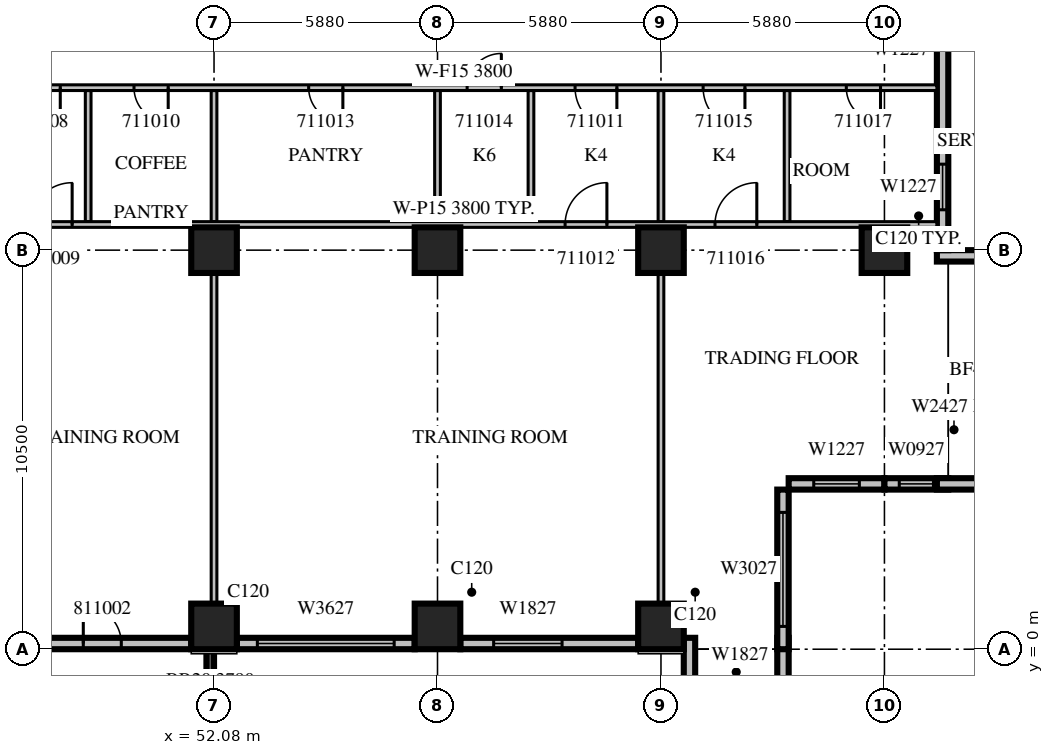
"""IFC4 building model, lengths in metres.
Left out: names, types, materials, properties, quantities, classifications, styles, units other than length and angle.
Written with IfcOpenShell. Run it as: python <this file> out.ifc"""

import sys

from ifc_helpers import new_model, si_unit, direction, frame, frame_2d, origin, origin_2d, place, context, subcontext, project, spatial, rectangle, extrude, source, transform, mapped, element, fill, save


model = new_model("IFC4")
c1 = context("Model", 3, precision=1e-05, world=origin(), true_north=direction((0.0, 1.0)))
c2 = subcontext(c1, "Body", "Model", "MODEL_VIEW")
j1 = project(units=[si_unit("LENGTHUNIT", "METRE"), si_unit("PLANEANGLEUNIT", "RADIAN")], contexts=[c1])
p1 = place(None, origin())
s1 = spatial("IfcSite", under=j1, at=p1, CompositionType="ELEMENT")
p2 = place(p1, origin())
s2 = spatial("IfcBuilding", under=s1, at=p2, CompositionType="ELEMENT")
p3 = place(p2, frame((0.0, 0.0, 57.3)))
s3 = spatial("IfcBuildingStorey", under=s2, at=p3, CompositionType="ELEMENT", Elevation=57.3)
m1 = source(origin(), c2, "Body", "SweptSolid", [
    extrude(rectangle(XDim=1.2, YDim=1.2, at=origin_2d()), origin(), (0.0, 0.0, 1.0), 4.2),
])
for number, where, z_axis, x_axis in (
    (1, (52.08, 0.6, 0.0), (0.0, 0.0, 1.0), (1.0, 0.0, 0.0)),
    (2, (57.96, 0.6, 0.0), (0.0, 0.0, 1.0), (1.0, 0.0, 0.0)),
    (3, (63.84, 0.6, 0.0), (0.0, 0.0, 1.0), (1.0, 0.0, 0.0)),
    (4, (52.08, 10.5, 0.0), (0.0, 0.0, 1.0), (1.0, 0.0, 0.0)),
    (5, (57.96, 10.5, 0.0), (0.0, 0.0, 1.0), (1.0, 0.0, 0.0)),
    (6, (63.84, 10.5, 0.0), (0.0, 0.0, 1.0), (1.0, 0.0, 0.0)),
    (7, (69.72, 10.5, 0.0), (0.0, 0.0, 1.0), (1.0, 0.0, 0.0)),
):
    element("IfcColumn", number, at=place(p3, frame(where, z_axis=z_axis, x_axis=x_axis)), inside=s3, PredefinedType="COLUMN", context=c2, shape_type="MappedRepresentation", body=[
        mapped(m1, transform((0.0, 0.0, 0.0), scale=1.0)),
    ])
m2 = source(origin(), c2, "Body", "SweptSolid", [
    extrude(rectangle(XDim=4.68, YDim=0.3, at=frame_2d((2.34, 0.0))), origin(), (0.0, 0.0, 1.0), 3.8),
])
p4 = place(p3, frame((46.8, 0.15, 0.0), z_axis=(0.0, 0.0, 1.0), x_axis=(1.0, 0.0, 0.0)))
e8 = element("IfcWall", 8, at=p4, inside=s3, PredefinedType="STANDARD", context=c2, shape_type="MappedRepresentation", body=[
    mapped(m2, transform((0.0, 0.0, 0.0), scale=1.0)),
])
m3 = source(origin(), c2, "Body", "SweptSolid", [
    extrude(rectangle(XDim=1.0, YDim=2.1, at=frame_2d((0.5, 1.05))), frame((0.0, 0.16, 0.0), z_axis=(0.0, -1.0, 0.0), x_axis=(1.0, 0.0, 0.0)), (0.0, 0.0, 1.0), 0.32),
])
p5 = place(p4, frame((1.84, 0.0, 0.0)))
e9 = element("IfcOpeningElement", 9, at=p5, cuts=e8, PredefinedType="OPENING", context=c2, shape_type="MappedRepresentation", body=[
    mapped(m3, transform((0.0, 0.0, 0.0), scale=1.0)),
])
p6 = place(p3, frame((52.68, 0.15, 0.0), z_axis=(0.0, 0.0, 1.0), x_axis=(1.0, 0.0, 0.0)))
e10 = element("IfcWall", 10, at=p6, inside=s3, PredefinedType="STANDARD", context=c2, shape_type="MappedRepresentation", body=[
    mapped(m2, transform((0.0, 0.0, 0.0), scale=1.0)),
])
m4 = source(origin(), c2, "Body", "SweptSolid", [
    extrude(rectangle(XDim=3.6, YDim=2.7, at=frame_2d((1.8, 1.35))), frame((0.0, 0.16, 0.0), z_axis=(0.0, -1.0, 0.0), x_axis=(1.0, 0.0, 0.0)), (0.0, 0.0, 1.0), 0.32),
])
p7 = place(p6, frame((0.54, 0.0, 0.6)))
e11 = element("IfcOpeningElement", 11, at=p7, cuts=e10, PredefinedType="OPENING", context=c2, shape_type="MappedRepresentation", body=[
    mapped(m4, transform((0.0, 0.0, 0.0), scale=1.0)),
])
p8 = place(p3, frame((58.56, 0.15, 0.0), z_axis=(0.0, 0.0, 1.0), x_axis=(1.0, 0.0, 0.0)))
e12 = element("IfcWall", 12, at=p8, inside=s3, PredefinedType="STANDARD", context=c2, shape_type="MappedRepresentation", body=[
    mapped(m2, transform((0.0, 0.0, 0.0), scale=1.0)),
])
m5 = source(origin(), c2, "Body", "SweptSolid", [
    extrude(rectangle(XDim=1.8, YDim=2.7, at=frame_2d((0.9, 1.35))), frame((0.0, 0.16, 0.0), z_axis=(0.0, -1.0, 0.0), x_axis=(1.0, 0.0, 0.0)), (0.0, 0.0, 1.0), 0.32),
])
p9 = place(p8, frame((0.877, 0.0, 0.6)))
e13 = element("IfcOpeningElement", 13, at=p9, cuts=e12, PredefinedType="OPENING", context=c2, shape_type="MappedRepresentation", body=[
    mapped(m5, transform((0.0, 0.0, 0.0), scale=1.0)),
])
m6 = source(origin(), c2, "Body", "SweptSolid", [
    extrude(rectangle(XDim=1.2, YDim=0.3, at=frame_2d((0.6, 0.0))), origin(), (0.0, 0.0, 1.0), 3.8),
])
for number, where, z_axis, x_axis in (
    (14, (64.59, 0.3, 0.0), (0.0, 0.0, 1.0), (0.0, -1.0, 0.0)),
    (15, (67.05, 0.3, 0.0), (0.0, 0.0, 1.0), (0.0, -1.0, 0.0)),
):
    element("IfcWall", number, at=place(p3, frame(where, z_axis=z_axis, x_axis=x_axis)), inside=s3, PredefinedType="STANDARD", context=c2, shape_type="MappedRepresentation", body=[
        mapped(m6, transform((0.0, 0.0, 0.0), scale=1.0)),
    ])
m7 = source(origin(), c2, "Body", "SweptSolid", [
    extrude(rectangle(XDim=4.2, YDim=0.3, at=frame_2d((2.1, 0.0))), origin(), (0.0, 0.0, 1.0), 3.8),
])
p10 = place(p3, frame((67.05, 0.0, 0.0), z_axis=(0.0, 0.0, 1.0), x_axis=(0.0, 1.0, 0.0)))
e16 = element("IfcWall", 16, at=p10, inside=s3, PredefinedType="STANDARD", context=c2, shape_type="MappedRepresentation", body=[
    mapped(m7, transform((0.0, 0.0, 0.0), scale=1.0)),
])
m8 = source(origin(), c2, "Body", "SweptSolid", [
    extrude(rectangle(XDim=3.0, YDim=2.7, at=frame_2d((1.5, 1.35))), frame((0.0, 0.16, 0.0), z_axis=(0.0, -1.0, 0.0), x_axis=(1.0, 0.0, 0.0)), (0.0, 0.0, 1.0), 0.32),
])
p11 = place(p10, frame((0.6, 0.0, 0.6)))
e17 = element("IfcOpeningElement", 17, at=p11, cuts=e16, PredefinedType="OPENING", context=c2, shape_type="MappedRepresentation", body=[
    mapped(m8, transform((0.0, 0.0, 0.0), scale=1.0)),
])
m9 = source(origin(), c2, "Body", "SweptSolid", [
    extrude(rectangle(XDim=2.52, YDim=0.3, at=frame_2d((1.26, 0.0))), origin(), (0.0, 0.0, 1.0), 3.8),
])
p12 = place(p3, frame((67.2, 4.35, 0.0), z_axis=(0.0, 0.0, 1.0), x_axis=(1.0, 0.0, 0.0)))
e18 = element("IfcWall", 18, at=p12, inside=s3, PredefinedType="STANDARD", context=c2, shape_type="MappedRepresentation", body=[
    mapped(m9, transform((0.0, 0.0, 0.0), scale=1.0)),
])
m10 = source(origin(), c2, "Body", "SweptSolid", [
    extrude(rectangle(XDim=1.2, YDim=2.7, at=frame_2d((0.6, 1.35))), frame((0.0, 0.16, 0.0), z_axis=(0.0, -1.0, 0.0), x_axis=(1.0, 0.0, 0.0)), (0.0, 0.0, 1.0), 0.32),
])
p13 = place(p12, frame((0.66, 0.0, 0.6)))
e19 = element("IfcOpeningElement", 19, at=p13, cuts=e18, PredefinedType="OPENING", context=c2, shape_type="MappedRepresentation", body=[
    mapped(m10, transform((0.0, 0.0, 0.0), scale=1.0)),
])
m11 = source(origin(), c2, "Body", "SweptSolid", [
    extrude(rectangle(XDim=1.68, YDim=0.3, at=frame_2d((0.84, 0.0))), origin(), (0.0, 0.0, 1.0), 3.8),
])
p14 = place(p3, frame((69.72, 4.35, 0.0), z_axis=(0.0, 0.0, 1.0), x_axis=(1.0, 0.0, 0.0)))
e20 = element("IfcWall", 20, at=p14, inside=s3, PredefinedType="STANDARD", context=c2, shape_type="MappedRepresentation", body=[
    mapped(m11, transform((0.0, 0.0, 0.0), scale=1.0)),
])
m12 = source(origin(), c2, "Body", "SweptSolid", [
    extrude(rectangle(XDim=0.9, YDim=2.7, at=frame_2d((0.45, 1.35))), frame((0.0, 0.16, 0.0), z_axis=(0.0, -1.0, 0.0), x_axis=(1.0, 0.0, 0.0)), (0.0, 0.0, 1.0), 0.32),
])
p15 = place(p14, frame((0.39, 0.0, 0.6)))
e21 = element("IfcOpeningElement", 21, at=p15, cuts=e20, PredefinedType="OPENING", context=c2, shape_type="MappedRepresentation", body=[
    mapped(m12, transform((0.0, 0.0, 0.0), scale=1.0)),
])
for number, where, z_axis, x_axis in (
    (22, (71.1, 4.35, 0.0), (0.0, 0.0, 1.0), (1.0, 0.0, 0.0)),
    (23, (71.1, 10.35, 0.0), (0.0, 0.0, 1.0), (1.0, 0.0, 0.0)),
):
    element("IfcWall", number, at=place(p3, frame(where, z_axis=z_axis, x_axis=x_axis)), inside=s3, PredefinedType="STANDARD", context=c2, shape_type="MappedRepresentation", body=[
        mapped(m6, transform((0.0, 0.0, 0.0), scale=1.0)),
    ])
m13 = source(origin(), c2, "Body", "SweptSolid", [
    extrude(rectangle(XDim=6.3, YDim=0.3, at=frame_2d((3.15, 0.0))), origin(), (0.0, 0.0, 1.0), 3.8),
])
p16 = place(p3, frame((71.25, 10.5, 0.0), z_axis=(0.0, 0.0, 1.0), x_axis=(0.0, 1.0, 0.0)))
e24 = element("IfcWall", 24, at=p16, inside=s3, PredefinedType="STANDARD", context=c2, shape_type="MappedRepresentation", body=[
    mapped(m13, transform((0.0, 0.0, 0.0), scale=1.0)),
])
p17 = place(p16, frame((1.062, 0.0, 0.6)))
e25 = element("IfcOpeningElement", 25, at=p17, cuts=e24, PredefinedType="OPENING", context=c2, shape_type="MappedRepresentation", body=[
    mapped(m10, transform((0.0, 0.0, 0.0), scale=1.0)),
])
m14 = source(origin(), c2, "Body", "SweptSolid", [
    extrude(rectangle(XDim=3.9, YDim=0.2, at=frame_2d((1.95, 0.0))), origin(), (0.0, 0.0, 1.0), 3.79),
])
p18 = place(p3, frame((51.98, 0.0, 0.0), z_axis=(0.0, 0.0, 1.0), x_axis=(0.0, -1.0, 0.0)))
e26 = element("IfcWall", 26, at=p18, inside=s3, PredefinedType="SOLIDWALL", context=c2, shape_type="MappedRepresentation", body=[
    mapped(m14, transform((0.0, 0.0, 0.0), scale=1.0)),
])
m15 = source(origin(), c2, "Body", "SweptSolid", [
    extrude(rectangle(XDim=2.4, YDim=2.7, at=frame_2d((1.2, 1.35))), frame((0.0, 0.11, 0.0), z_axis=(0.0, -1.0, 0.0), x_axis=(1.0, 0.0, 0.0)), (0.0, 0.0, 1.0), 0.22),
])
p19 = place(p18, frame((0.75, 0.0, 0.6)))
e27 = element("IfcOpeningElement", 27, at=p19, cuts=e26, PredefinedType="OPENING", context=c2, shape_type="MappedRepresentation", body=[
    mapped(m15, transform((0.0, 0.0, 0.0), scale=1.0)),
])
p20 = place(p3, frame((48.768, 11.25, 0.0), z_axis=(0.0, 0.0, 1.0), x_axis=(0.0, 1.0, 0.0)))
e28 = element("IfcWall", 28, at=p20, inside=s3, PredefinedType="PARTITIONING", context=c2, shape_type="SweptSolid", body=[
    extrude(rectangle(XDim=3.45, YDim=0.15, at=frame_2d((1.725, 0.0))), origin(), (0.0, 0.0, 1.0), 3.8),
])
m16 = source(origin(), c2, "Body", "SweptSolid", [
    extrude(rectangle(XDim=3.45, YDim=0.15, at=frame_2d((1.725, 0.0))), origin(), (0.0, 0.0, 1.0), 3.8),
])
for number, where, z_axis, x_axis in (
    (29, (57.96, 11.25, 0.0), (0.0, 0.0, 1.0), (0.0, 1.0, 0.0)),
    (30, (60.42, 11.25, 0.0), (0.0, 0.0, 1.0), (0.0, 1.0, 0.0)),
    (31, (67.158, 11.25, 0.0), (0.0, 0.0, 1.0), (0.0, 1.0, 0.0)),
):
    element("IfcWall", number, at=place(p3, frame(where, z_axis=z_axis, x_axis=x_axis)), inside=s3, PredefinedType="PARTITIONING", context=c2, shape_type="MappedRepresentation", body=[
        mapped(m16, transform((0.0, 0.0, 0.0), scale=1.0)),
    ])
m17 = source(origin(), c2, "Body", "SweptSolid", [
    extrude(rectangle(XDim=8.702, YDim=0.15, at=frame_2d((4.351, 0.0))), origin(), (0.0, 0.0, 1.0), 3.8),
])
p21 = place(p3, frame((52.08, 1.199, 0.0), z_axis=(0.0, 0.0, 1.0), x_axis=(0.0, 1.0, 0.0)))
e32 = element("IfcWall", 32, at=p21, inside=s3, PredefinedType="PARTITIONING", context=c2, shape_type="MappedRepresentation", body=[
    mapped(m17, transform((0.0, 0.0, 0.0), scale=1.0)),
])
p22 = place(p3, frame((52.08, 11.25, 0.0), z_axis=(0.0, 0.0, 1.0), x_axis=(0.0, 1.0, 0.0)))
e33 = element("IfcWall", 33, at=p22, inside=s3, PredefinedType="PARTITIONING", context=c2, shape_type="MappedRepresentation", body=[
    mapped(m16, transform((0.0, 0.0, 0.0), scale=1.0)),
])
p23 = place(p3, frame((63.84, 1.199, 0.0), z_axis=(0.0, 0.0, 1.0), x_axis=(0.0, 1.0, 0.0)))
e34 = element("IfcWall", 34, at=p23, inside=s3, PredefinedType="PARTITIONING", context=c2, shape_type="MappedRepresentation", body=[
    mapped(m17, transform((0.0, 0.0, 0.0), scale=1.0)),
])
p24 = place(p3, frame((63.84, 11.25, 0.0), z_axis=(0.0, 0.0, 1.0), x_axis=(0.0, 1.0, 0.0)))
e35 = element("IfcWall", 35, at=p24, inside=s3, PredefinedType="PARTITIONING", context=c2, shape_type="MappedRepresentation", body=[
    mapped(m16, transform((0.0, 0.0, 0.0), scale=1.0)),
])
m18 = source(origin(), c2, "Body", "SweptSolid", [
    extrude(rectangle(XDim=24.9, YDim=0.15, at=frame_2d((12.45, 0.0))), origin(), (0.0, 0.0, 1.0), 3.8),
])
p25 = place(p3, frame((71.1, 11.175, 0.0), z_axis=(0.0, 0.0, 1.0), x_axis=(-1.0, 0.0, 0.0)))
e36 = element("IfcWall", 36, at=p25, inside=s3, PredefinedType="PARTITIONING", context=c2, shape_type="MappedRepresentation", body=[
    mapped(m18, transform((0.0, 0.0, 0.0), scale=1.0)),
])
m19 = source(origin(), c2, "Body", "SweptSolid", [
    extrude(rectangle(XDim=1.1, YDim=2.1, at=frame_2d((0.55, 1.05))), frame((0.0, 0.085, 0.0), z_axis=(0.0, -1.0, 0.0), x_axis=(1.0, 0.0, 0.0)), (0.0, 0.0, 1.0), 0.17),
])
p26 = place(p25, frame((22.753, 0.0, 0.0)))
e37 = element("IfcOpeningElement", 37, at=p26, cuts=e36, PredefinedType="OPENING", context=c2, shape_type="MappedRepresentation", body=[
    mapped(m19, transform((0.0, 0.0, 0.0), scale=1.0)),
])
p27 = place(p25, frame((8.683, 0.0, 0.0)))
e38 = element("IfcOpeningElement", 38, at=p27, cuts=e36, PredefinedType="OPENING", context=c2, shape_type="MappedRepresentation", body=[
    mapped(m19, transform((0.0, 0.0, 0.0), scale=1.0)),
])
p28 = place(p25, frame((4.738, 0.0, 0.0)))
e39 = element("IfcOpeningElement", 39, at=p28, cuts=e36, PredefinedType="OPENING", context=c2, shape_type="MappedRepresentation", body=[
    mapped(m19, transform((0.0, 0.0, 0.0), scale=1.0)),
])
p29 = place(p3, frame((71.1, 14.775, 0.0), z_axis=(0.0, 0.0, 1.0), x_axis=(-1.0, 0.0, 0.0)))
e40 = element("IfcWall", 40, at=p29, inside=s3, PredefinedType="PARTITIONING", context=c2, shape_type="MappedRepresentation", body=[
    mapped(m18, transform((0.0, 0.0, 0.0), scale=1.0)),
])
p30 = place(p29, frame((23.066, 0.0, 0.0)))
e41 = element("IfcOpeningElement", 41, at=p30, cuts=e40, PredefinedType="OPENING", context=c2, shape_type="MappedRepresentation", body=[
    mapped(m19, transform((0.0, 0.0, 0.0), scale=1.0)),
])
m20 = source(origin(), c2, "Body", "SweptSolid", [
    extrude(rectangle(XDim=0.9, YDim=2.1, at=frame_2d((0.45, 1.05))), frame((0.0, 0.085, 0.0), z_axis=(0.0, -1.0, 0.0), x_axis=(1.0, 0.0, 0.0)), (0.0, 0.0, 1.0), 0.17),
])
p31 = place(p29, frame((20.226, 0.0, 0.0)))
e42 = element("IfcOpeningElement", 42, at=p31, cuts=e40, PredefinedType="OPENING", context=c2, shape_type="MappedRepresentation", body=[
    mapped(m20, transform((0.0, 0.0, 0.0), scale=1.0)),
])
p32 = place(p29, frame((8.42, 0.0, 0.0)))
e43 = element("IfcOpeningElement", 43, at=p32, cuts=e40, PredefinedType="OPENING", context=c2, shape_type="MappedRepresentation", body=[
    mapped(m19, transform((0.0, 0.0, 0.0), scale=1.0)),
])
p33 = place(p29, frame((15.63, 0.0, 0.0)))
e44 = element("IfcOpeningElement", 44, at=p33, cuts=e40, PredefinedType="OPENING", context=c2, shape_type="MappedRepresentation", body=[
    mapped(m20, transform((0.0, 0.0, 0.0), scale=1.0)),
])
p34 = place(p29, frame((11.46, 0.0, 0.0)))
e45 = element("IfcOpeningElement", 45, at=p34, cuts=e40, PredefinedType="OPENING", context=c2, shape_type="MappedRepresentation", body=[
    mapped(m20, transform((0.0, 0.0, 0.0), scale=1.0)),
])
p35 = place(p29, frame((5.051, 0.0, 0.0)))
e46 = element("IfcOpeningElement", 46, at=p35, cuts=e40, PredefinedType="OPENING", context=c2, shape_type="MappedRepresentation", body=[
    mapped(m19, transform((0.0, 0.0, 0.0), scale=1.0)),
])
p36 = place(p29, frame((1.483, 0.0, 0.0)))
e47 = element("IfcOpeningElement", 47, at=p36, cuts=e40, PredefinedType="OPENING", context=c2, shape_type="MappedRepresentation", body=[
    mapped(m20, transform((0.0, 0.0, 0.0), scale=1.0)),
])
m21 = source(origin(), c2, "Body", "SweptSolid", [
    extrude(rectangle(XDim=3.6, YDim=2.7, at=frame_2d((1.8, 1.35))), frame((0.0, 0.03, 0.0), z_axis=(0.0, -1.0, 0.0), x_axis=(1.0, 0.0, 0.0)), (0.0, 0.0, 1.0), 0.06),
])
p37 = place(p7, origin())
e48 = element("IfcWindow", 48, at=p37, inside=s3, PartitioningType="SINGLE_PANEL", PredefinedType="WINDOW", context=c2, shape_type="MappedRepresentation", body=[
    mapped(m21, transform((0.0, 0.0, 0.0), scale=1.0)),
])
fill(e11, e48)
m22 = source(origin(), c2, "Body", "SweptSolid", [
    extrude(rectangle(XDim=1.8, YDim=2.7, at=frame_2d((0.9, 1.35))), frame((0.0, 0.03, 0.0), z_axis=(0.0, -1.0, 0.0), x_axis=(1.0, 0.0, 0.0)), (0.0, 0.0, 1.0), 0.06),
])
p38 = place(p9, origin())
e49 = element("IfcWindow", 49, at=p38, inside=s3, PartitioningType="SINGLE_PANEL", PredefinedType="WINDOW", context=c2, shape_type="MappedRepresentation", body=[
    mapped(m22, transform((0.0, 0.0, 0.0), scale=1.0)),
])
fill(e13, e49)
m23 = source(origin(), c2, "Body", "SweptSolid", [
    extrude(rectangle(XDim=3.0, YDim=2.7, at=frame_2d((1.5, 1.35))), frame((0.0, 0.03, 0.0), z_axis=(0.0, -1.0, 0.0), x_axis=(1.0, 0.0, 0.0)), (0.0, 0.0, 1.0), 0.06),
])
p39 = place(p11, origin())
e50 = element("IfcWindow", 50, at=p39, inside=s3, PartitioningType="SINGLE_PANEL", PredefinedType="WINDOW", context=c2, shape_type="MappedRepresentation", body=[
    mapped(m23, transform((0.0, 0.0, 0.0), scale=1.0)),
])
fill(e17, e50)
m24 = source(origin(), c2, "Body", "SweptSolid", [
    extrude(rectangle(XDim=1.2, YDim=2.7, at=frame_2d((0.6, 1.35))), frame((0.0, 0.03, 0.0), z_axis=(0.0, -1.0, 0.0), x_axis=(1.0, 0.0, 0.0)), (0.0, 0.0, 1.0), 0.06),
])
p40 = place(p13, origin())
e51 = element("IfcWindow", 51, at=p40, inside=s3, PartitioningType="SINGLE_PANEL", PredefinedType="WINDOW", context=c2, shape_type="MappedRepresentation", body=[
    mapped(m24, transform((0.0, 0.0, 0.0), scale=1.0)),
])
fill(e19, e51)
m25 = source(origin(), c2, "Body", "SweptSolid", [
    extrude(rectangle(XDim=0.9, YDim=2.7, at=frame_2d((0.45, 1.35))), frame((0.0, 0.03, 0.0), z_axis=(0.0, -1.0, 0.0), x_axis=(1.0, 0.0, 0.0)), (0.0, 0.0, 1.0), 0.06),
])
p41 = place(p15, origin())
e52 = element("IfcWindow", 52, at=p41, inside=s3, PartitioningType="SINGLE_PANEL", PredefinedType="WINDOW", context=c2, shape_type="MappedRepresentation", body=[
    mapped(m25, transform((0.0, 0.0, 0.0), scale=1.0)),
])
fill(e21, e52)
p42 = place(p17, origin())
e53 = element("IfcWindow", 53, at=p42, inside=s3, PartitioningType="SINGLE_PANEL", PredefinedType="WINDOW", context=c2, shape_type="MappedRepresentation", body=[
    mapped(m24, transform((0.0, 0.0, 0.0), scale=1.0)),
])
fill(e25, e53)
m26 = source(origin(), c2, "Body", "SweptSolid", [
    extrude(rectangle(XDim=1.1, YDim=2.1, at=frame_2d((0.55, 1.05))), frame((0.0, 0.025, 0.0), z_axis=(0.0, -1.0, 0.0), x_axis=(1.0, 0.0, 0.0)), (0.0, 0.0, 1.0), 0.05),
])
p43 = place(p30, origin())
e54 = element("IfcDoor", 54, at=p43, inside=s3, OperationType="SINGLE_SWING_LEFT", PredefinedType="DOOR", context=c2, shape_type="MappedRepresentation", body=[
    mapped(m26, transform((0.0, 0.0, 0.0), scale=1.0)),
])
fill(e41, e54)
p44 = place(p26, origin())
e55 = element("IfcDoor", 55, at=p44, inside=s3, OperationType="SINGLE_SWING_RIGHT", PredefinedType="DOOR", context=c2, shape_type="MappedRepresentation", body=[
    mapped(m26, transform((0.0, 0.0, 0.0), scale=1.0)),
])
fill(e37, e55)
m27 = source(origin(), c2, "Body", "SweptSolid", [
    extrude(rectangle(XDim=0.9, YDim=2.1, at=frame_2d((0.45, 1.05))), frame((0.0, 0.025, 0.0), z_axis=(0.0, -1.0, 0.0), x_axis=(1.0, 0.0, 0.0)), (0.0, 0.0, 1.0), 0.05),
])
p45 = place(p31, origin())
e56 = element("IfcDoor", 56, at=p45, inside=s3, OperationType="SINGLE_SWING_LEFT", PredefinedType="DOOR", context=c2, shape_type="MappedRepresentation", body=[
    mapped(m27, transform((0.0, 0.0, 0.0), scale=1.0)),
])
fill(e42, e56)
p46 = place(p32, origin())
e57 = element("IfcDoor", 57, at=p46, inside=s3, OperationType="SINGLE_SWING_LEFT", PredefinedType="DOOR", context=c2, shape_type="MappedRepresentation", body=[
    mapped(m26, transform((0.0, 0.0, 0.0), scale=1.0)),
])
fill(e43, e57)
p47 = place(p27, origin())
e58 = element("IfcDoor", 58, at=p47, inside=s3, OperationType="SINGLE_SWING_RIGHT", PredefinedType="DOOR", context=c2, shape_type="MappedRepresentation", body=[
    mapped(m26, transform((0.0, 0.0, 0.0), scale=1.0)),
])
fill(e38, e58)
p48 = place(p33, origin())
e59 = element("IfcDoor", 59, at=p48, inside=s3, OperationType="SINGLE_SWING_LEFT", PredefinedType="DOOR", context=c2, shape_type="MappedRepresentation", body=[
    mapped(m27, transform((0.0, 0.0, 0.0), scale=1.0)),
])
fill(e44, e59)
p49 = place(p34, origin())
e60 = element("IfcDoor", 60, at=p49, inside=s3, OperationType="SINGLE_SWING_RIGHT", PredefinedType="DOOR", context=c2, shape_type="MappedRepresentation", body=[
    mapped(m27, transform((0.0, 0.0, 0.0), scale=1.0)),
])
fill(e45, e60)
p50 = place(p35, origin())
e61 = element("IfcDoor", 61, at=p50, inside=s3, OperationType="SINGLE_SWING_LEFT", PredefinedType="DOOR", context=c2, shape_type="MappedRepresentation", body=[
    mapped(m26, transform((0.0, 0.0, 0.0), scale=1.0)),
])
fill(e46, e61)
p51 = place(p28, origin())
e62 = element("IfcDoor", 62, at=p51, inside=s3, OperationType="SINGLE_SWING_RIGHT", PredefinedType="DOOR", context=c2, shape_type="MappedRepresentation", body=[
    mapped(m26, transform((0.0, 0.0, 0.0), scale=1.0)),
])
fill(e39, e62)
p52 = place(p36, origin())
e63 = element("IfcDoor", 63, at=p52, inside=s3, OperationType="SINGLE_SWING_LEFT", PredefinedType="DOOR", context=c2, shape_type="MappedRepresentation", body=[
    mapped(m27, transform((0.0, 0.0, 0.0), scale=1.0)),
])
fill(e47, e63)
m28 = source(origin(), c2, "Body", "SweptSolid", [
    extrude(rectangle(XDim=1.0, YDim=2.1, at=frame_2d((0.5, 1.05))), frame((0.0, 0.025, 0.0), z_axis=(0.0, -1.0, 0.0), x_axis=(1.0, 0.0, 0.0)), (0.0, 0.0, 1.0), 0.05),
])
p53 = place(p5, origin())
e64 = element("IfcDoor", 64, at=p53, inside=s3, OperationType="SINGLE_SWING_LEFT", PredefinedType="DOOR", context=c2, shape_type="MappedRepresentation", body=[
    mapped(m28, transform((0.0, 0.0, 0.0), scale=1.0)),
])
fill(e9, e64)
save(model, sys.argv[1])
